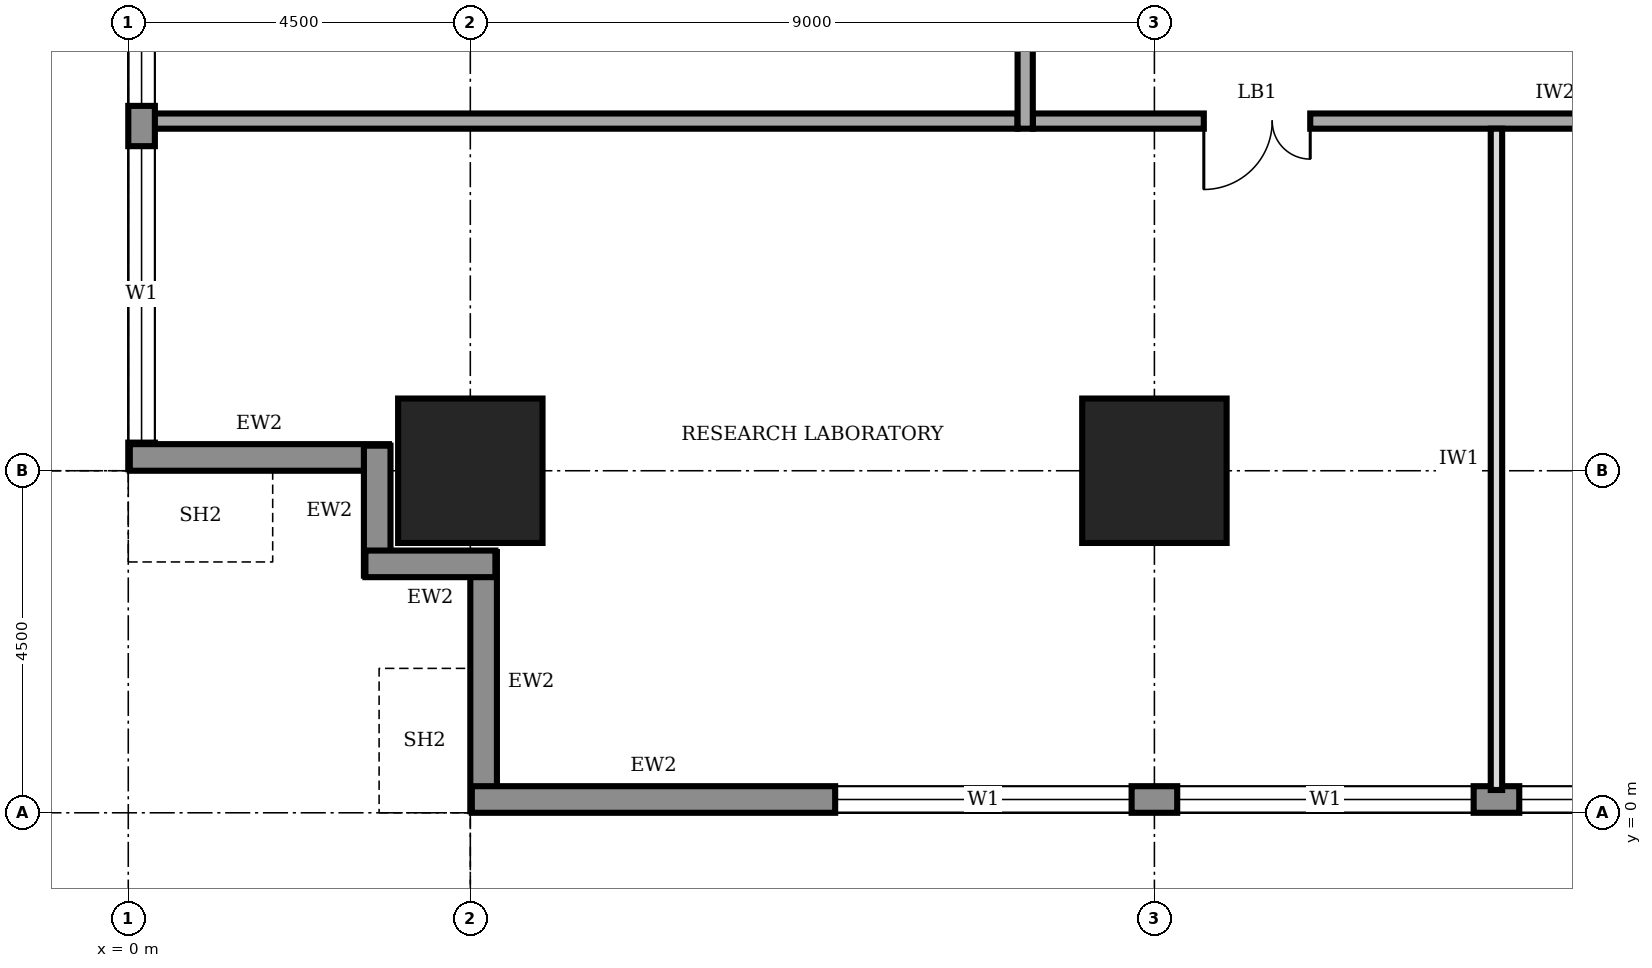
"""IFC4 building model, lengths in metres.
Left out: names, types, materials, properties, quantities, classifications, styles, units other than length and angle.
Written with IfcOpenShell. Run it as: python <this file> out.ifc"""

import sys

from ifc_helpers import new_model, si_unit, direction, frame, frame_2d, origin, origin_2d, place, context, subcontext, project, spatial, rectangle, extrude, element, fill, save


model = new_model("IFC4")
c1 = context("Model", 3, precision=1e-05, world=origin(), true_north=direction((0.0, 1.0)))
c2 = subcontext(c1, "Body", "Model", "MODEL_VIEW")
j1 = project(units=[si_unit("LENGTHUNIT", "METRE"), si_unit("PLANEANGLEUNIT", "RADIAN")], contexts=[c1])
p1 = place(None, origin())
s1 = spatial("IfcSite", under=j1, at=p1, CompositionType="ELEMENT")
p2 = place(p1, origin())
s2 = spatial("IfcBuilding", under=s1, at=p2, CompositionType="ELEMENT")
p3 = place(p2, frame((0.0, 0.0, 125.0)))
s3 = spatial("IfcBuildingStorey", under=s2, at=p3, CompositionType="ELEMENT", Elevation=125.0)
for number, where, z_axis, x_axis in (
    (1, (4.5, 4.5, 0.0), (0.0, 0.0, 1.0), (1.0, 0.0, 0.0)),
    (2, (13.5, 4.5, 0.0), (0.0, 0.0, 1.0), (1.0, 0.0, 0.0)),
):
    element("IfcColumn", number, at=place(p3, frame(where, z_axis=z_axis, x_axis=x_axis)), inside=s3, PredefinedType="COLUMN", context=c2, shape_type="SweptSolid", body=[
        extrude(rectangle(XDim=1.9, YDim=1.9, at=origin_2d()), origin(), (0.0, 0.0, 1.0), 4.0),
    ])
p4 = place(p3, frame((4.675, 3.43, 0.0), z_axis=(0.0, 0.0, 1.0), x_axis=(0.0, -1.0, 0.0)))
e3 = element("IfcWall", 3, at=p4, inside=s3, PredefinedType="STANDARD", context=c2, shape_type="SweptSolid", body=[
    extrude(rectangle(XDim=3.41, YDim=0.35, at=frame_2d((1.705, 0.0))), origin(), (0.0, 0.0, 1.0), 2.85),
])
p5 = place(p3, frame((4.52, 0.175, 0.0), z_axis=(0.0, 0.0, 1.0), x_axis=(1.0, 0.0, 0.0)))
e4 = element("IfcWall", 4, at=p5, inside=s3, PredefinedType="STANDARD", context=c2, shape_type="SweptSolid", body=[
    extrude(rectangle(XDim=31.46, YDim=0.35, at=frame_2d((15.73, 0.0))), origin(), (0.0, 0.0, 1.0), 3.75),
])
p6 = place(p5, frame((4.78, 0.0, 0.9)))
e5 = element("IfcOpeningElement", 5, at=p6, cuts=e4, PredefinedType="OPENING", context=c2, shape_type="SweptSolid", body=[
    extrude(rectangle(XDim=3.9, YDim=2.2, at=frame_2d((1.95, 1.1))), frame((0.0, 0.185, 0.0), z_axis=(0.0, -1.0, 0.0), x_axis=(1.0, 0.0, 0.0)), (0.0, 0.0, 1.0), 0.37),
])
p7 = place(p5, frame((9.28, 0.0, 0.9)))
e6 = element("IfcOpeningElement", 6, at=p7, cuts=e4, PredefinedType="OPENING", context=c2, shape_type="SweptSolid", body=[
    extrude(rectangle(XDim=3.9, YDim=2.2, at=frame_2d((1.95, 1.1))), frame((0.0, 0.185, 0.0), z_axis=(0.0, -1.0, 0.0), x_axis=(1.0, 0.0, 0.0)), (0.0, 0.0, 1.0), 0.37),
])
p8 = place(p5, frame((13.78, 0.0, 0.9)))
e7 = element("IfcOpeningElement", 7, at=p8, cuts=e4, PredefinedType="OPENING", context=c2, shape_type="SweptSolid", body=[
    extrude(rectangle(XDim=3.9, YDim=2.2, at=frame_2d((1.95, 1.1))), frame((0.0, 0.185, 0.0), z_axis=(0.0, -1.0, 0.0), x_axis=(1.0, 0.0, 0.0)), (0.0, 0.0, 1.0), 0.37),
])
p9 = place(p5, frame((18.28, 0.0, 0.9)))
e8 = element("IfcOpeningElement", 8, at=p9, cuts=e4, PredefinedType="OPENING", context=c2, shape_type="SweptSolid", body=[
    extrude(rectangle(XDim=3.9, YDim=2.2, at=frame_2d((1.95, 1.1))), frame((0.0, 0.185, 0.0), z_axis=(0.0, -1.0, 0.0), x_axis=(1.0, 0.0, 0.0)), (0.0, 0.0, 1.0), 0.37),
])
p10 = place(p5, frame((22.78, 0.0, 0.9)))
e9 = element("IfcOpeningElement", 9, at=p10, cuts=e4, PredefinedType="OPENING", context=c2, shape_type="SweptSolid", body=[
    extrude(rectangle(XDim=3.9, YDim=2.2, at=frame_2d((1.95, 1.1))), frame((0.0, 0.185, 0.0), z_axis=(0.0, -1.0, 0.0), x_axis=(1.0, 0.0, 0.0)), (0.0, 0.0, 1.0), 0.37),
])
p11 = place(p5, frame((27.21, 0.0, 0.9)))
e10 = element("IfcOpeningElement", 10, at=p11, cuts=e4, PredefinedType="OPENING", context=c2, shape_type="SweptSolid", body=[
    extrude(rectangle(XDim=3.9, YDim=2.2, at=frame_2d((1.95, 1.1))), frame((0.0, 0.185, 0.0), z_axis=(0.0, -1.0, 0.0), x_axis=(1.0, 0.0, 0.0)), (0.0, 0.0, 1.0), 0.37),
])
p12 = place(p3, frame((0.175, 35.98, 0.0), z_axis=(0.0, 0.0, 1.0), x_axis=(0.0, -1.0, 0.0)))
e11 = element("IfcWall", 11, at=p12, inside=s3, PredefinedType="STANDARD", context=c2, shape_type="SweptSolid", body=[
    extrude(rectangle(XDim=31.46, YDim=0.35, at=frame_2d((15.73, 0.0))), origin(), (0.0, 0.0, 1.0), 3.75),
])
p13 = place(p12, frame((27.21, 0.0, 0.9)))
e12 = element("IfcOpeningElement", 12, at=p13, cuts=e11, PredefinedType="OPENING", context=c2, shape_type="SweptSolid", body=[
    extrude(rectangle(XDim=3.9, YDim=2.2, at=frame_2d((1.95, 1.1))), frame((0.0, 0.185, 0.0), z_axis=(0.0, -1.0, 0.0), x_axis=(1.0, 0.0, 0.0)), (0.0, 0.0, 1.0), 0.37),
])
p14 = place(p12, frame((22.78, 0.0, 0.9)))
e13 = element("IfcOpeningElement", 13, at=p14, cuts=e11, PredefinedType="OPENING", context=c2, shape_type="SweptSolid", body=[
    extrude(rectangle(XDim=3.9, YDim=2.2, at=frame_2d((1.95, 1.1))), frame((0.0, 0.185, 0.0), z_axis=(0.0, -1.0, 0.0), x_axis=(1.0, 0.0, 0.0)), (0.0, 0.0, 1.0), 0.37),
])
p15 = place(p12, frame((18.28, 0.0, 0.9)))
e14 = element("IfcOpeningElement", 14, at=p15, cuts=e11, PredefinedType="OPENING", context=c2, shape_type="SweptSolid", body=[
    extrude(rectangle(XDim=3.9, YDim=2.2, at=frame_2d((1.95, 1.1))), frame((0.0, 0.185, 0.0), z_axis=(0.0, -1.0, 0.0), x_axis=(1.0, 0.0, 0.0)), (0.0, 0.0, 1.0), 0.37),
])
p16 = place(p12, frame((13.78, 0.0, 0.9)))
e15 = element("IfcOpeningElement", 15, at=p16, cuts=e11, PredefinedType="OPENING", context=c2, shape_type="SweptSolid", body=[
    extrude(rectangle(XDim=3.9, YDim=2.2, at=frame_2d((1.95, 1.1))), frame((0.0, 0.185, 0.0), z_axis=(0.0, -1.0, 0.0), x_axis=(1.0, 0.0, 0.0)), (0.0, 0.0, 1.0), 0.37),
])
p17 = place(p12, frame((9.28, 0.0, 0.9)))
e16 = element("IfcOpeningElement", 16, at=p17, cuts=e11, PredefinedType="OPENING", context=c2, shape_type="SweptSolid", body=[
    extrude(rectangle(XDim=3.9, YDim=2.2, at=frame_2d((1.95, 1.1))), frame((0.0, 0.185, 0.0), z_axis=(0.0, -1.0, 0.0), x_axis=(1.0, 0.0, 0.0)), (0.0, 0.0, 1.0), 0.37),
])
p18 = place(p12, frame((4.78, 0.0, 0.9)))
e17 = element("IfcOpeningElement", 17, at=p18, cuts=e11, PredefinedType="OPENING", context=c2, shape_type="SweptSolid", body=[
    extrude(rectangle(XDim=3.9, YDim=2.2, at=frame_2d((1.95, 1.1))), frame((0.0, 0.185, 0.0), z_axis=(0.0, -1.0, 0.0), x_axis=(1.0, 0.0, 0.0)), (0.0, 0.0, 1.0), 0.37),
])
p19 = place(p3, frame((0.02, 4.675, 0.0), z_axis=(0.0, 0.0, 1.0), x_axis=(1.0, 0.0, 0.0)))
e18 = element("IfcWall", 18, at=p19, inside=s3, PredefinedType="STANDARD", context=c2, shape_type="SweptSolid", body=[
    extrude(rectangle(XDim=3.41, YDim=0.35, at=frame_2d((1.705, 0.0))), origin(), (0.0, 0.0, 1.0), 2.85),
])
for number, where, z_axis, x_axis in (
    (19, (3.275, 4.83, 0.0), (0.0, 0.0, 1.0), (0.0, -1.0, 0.0)),
    (20, (3.12, 3.275, 0.0), (0.0, 0.0, 1.0), (1.0, 0.0, 0.0)),
):
    element("IfcWall", number, at=place(p3, frame(where, z_axis=z_axis, x_axis=x_axis)), inside=s3, PredefinedType="STANDARD", context=c2, shape_type="SweptSolid", body=[
        extrude(rectangle(XDim=1.71, YDim=0.35, at=frame_2d((0.855, 0.0))), origin(), (0.0, 0.0, 1.0), 3.75),
    ])
p20 = place(p3, frame((11.9, 9.1, 0.0), z_axis=(0.0, 0.0, 1.0), x_axis=(1.0, 0.0, 0.0)))
e21 = element("IfcWall", 21, at=p20, inside=s3, PredefinedType="SOLIDWALL", context=c2, shape_type="SweptSolid", body=[
    extrude(rectangle(XDim=17.65, YDim=0.2, at=frame_2d((8.825, 0.0))), origin(), (0.0, 0.0, 1.0), 3.75),
])
p21 = place(p20, frame((2.25, 0.0, 0.0)))
e22 = element("IfcOpeningElement", 22, at=p21, cuts=e21, PredefinedType="OPENING", context=c2, shape_type="SweptSolid", body=[
    extrude(rectangle(XDim=1.4, YDim=2.1, at=frame_2d((0.7, 1.05))), frame((0.0, 0.11, 0.0), z_axis=(0.0, -1.0, 0.0), x_axis=(1.0, 0.0, 0.0)), (0.0, 0.0, 1.0), 0.22),
])
p22 = place(p20, frame((10.1, 0.0, 0.0)))
e23 = element("IfcOpeningElement", 23, at=p22, cuts=e21, PredefinedType="OPENING", context=c2, shape_type="SweptSolid", body=[
    extrude(rectangle(XDim=1.0, YDim=2.1, at=frame_2d((0.5, 1.05))), frame((0.0, 0.11, 0.0), z_axis=(0.0, -1.0, 0.0), x_axis=(1.0, 0.0, 0.0)), (0.0, 0.0, 1.0), 0.22),
])
p23 = place(p20, frame((15.875, 0.0, 0.0)))
e24 = element("IfcOpeningElement", 24, at=p23, cuts=e21, PredefinedType="OPENING", context=c2, shape_type="SweptSolid", body=[
    extrude(rectangle(XDim=1.0, YDim=2.1, at=frame_2d((0.5, 1.05))), frame((0.0, 0.11, 0.0), z_axis=(0.0, -1.0, 0.0), x_axis=(1.0, 0.0, 0.0)), (0.0, 0.0, 1.0), 0.22),
])
p24 = place(p3, frame((11.8, 32.05, 0.0), z_axis=(0.0, 0.0, 1.0), x_axis=(0.0, -1.0, 0.0)))
e25 = element("IfcWall", 25, at=p24, inside=s3, PredefinedType="SOLIDWALL", context=c2, shape_type="SweptSolid", body=[
    extrude(rectangle(XDim=23.05, YDim=0.2, at=frame_2d((11.525, 0.0))), origin(), (0.0, 0.0, 1.0), 3.75),
])
p25 = place(p24, frame((20.3, 0.0, 0.0)))
e26 = element("IfcOpeningElement", 26, at=p25, cuts=e25, PredefinedType="OPENING", context=c2, shape_type="SweptSolid", body=[
    extrude(rectangle(XDim=1.0, YDim=2.1, at=frame_2d((0.5, 1.05))), frame((0.0, 0.11, 0.0), z_axis=(0.0, -1.0, 0.0), x_axis=(1.0, 0.0, 0.0)), (0.0, 0.0, 1.0), 0.22),
])
p26 = place(p24, frame((16.95, 0.0, 0.0)))
e27 = element("IfcOpeningElement", 27, at=p26, cuts=e25, PredefinedType="OPENING", context=c2, shape_type="SweptSolid", body=[
    extrude(rectangle(XDim=1.0, YDim=2.1, at=frame_2d((0.5, 1.05))), frame((0.0, 0.11, 0.0), z_axis=(0.0, -1.0, 0.0), x_axis=(1.0, 0.0, 0.0)), (0.0, 0.0, 1.0), 0.22),
])
p27 = place(p24, frame((13.95, 0.0, 0.0)))
e28 = element("IfcOpeningElement", 28, at=p27, cuts=e25, PredefinedType="OPENING", context=c2, shape_type="SweptSolid", body=[
    extrude(rectangle(XDim=0.9, YDim=2.1, at=frame_2d((0.45, 1.05))), frame((0.0, 0.11, 0.0), z_axis=(0.0, -1.0, 0.0), x_axis=(1.0, 0.0, 0.0)), (0.0, 0.0, 1.0), 0.22),
])
p28 = place(p24, frame((10.9, 0.0, 0.0)))
e29 = element("IfcOpeningElement", 29, at=p28, cuts=e25, PredefinedType="OPENING", context=c2, shape_type="SweptSolid", body=[
    extrude(rectangle(XDim=0.9, YDim=2.1, at=frame_2d((0.45, 1.05))), frame((0.0, 0.11, 0.0), z_axis=(0.0, -1.0, 0.0), x_axis=(1.0, 0.0, 0.0)), (0.0, 0.0, 1.0), 0.22),
])
p29 = place(p24, frame((6.2, 0.0, 0.0)))
e30 = element("IfcOpeningElement", 30, at=p29, cuts=e25, PredefinedType="OPENING", context=c2, shape_type="SweptSolid", body=[
    extrude(rectangle(XDim=0.9, YDim=2.1, at=frame_2d((0.45, 1.05))), frame((0.0, 0.11, 0.0), z_axis=(0.0, -1.0, 0.0), x_axis=(1.0, 0.0, 0.0)), (0.0, 0.0, 1.0), 0.22),
])
p30 = place(p24, frame((8.75, 0.0, 0.0)))
e31 = element("IfcOpeningElement", 31, at=p30, cuts=e25, PredefinedType="OPENING", context=c2, shape_type="SweptSolid", body=[
    extrude(rectangle(XDim=1.0, YDim=2.1, at=frame_2d((0.5, 1.05))), frame((0.0, 0.11, 0.0), z_axis=(0.0, -1.0, 0.0), x_axis=(1.0, 0.0, 0.0)), (0.0, 0.0, 1.0), 0.22),
])
p31 = place(p24, frame((1.925, 0.0, 0.0)))
e32 = element("IfcOpeningElement", 32, at=p31, cuts=e25, PredefinedType="OPENING", context=c2, shape_type="SweptSolid", body=[
    extrude(rectangle(XDim=1.0, YDim=2.1, at=frame_2d((0.5, 1.05))), frame((0.0, 0.11, 0.0), z_axis=(0.0, -1.0, 0.0), x_axis=(1.0, 0.0, 0.0)), (0.0, 0.0, 1.0), 0.22),
])
p32 = place(p3, frame((0.3, 9.1, 0.0), z_axis=(0.0, 0.0, 1.0), x_axis=(1.0, 0.0, 0.0)))
e33 = element("IfcWall", 33, at=p32, inside=s3, PredefinedType="SOLIDWALL", context=c2, shape_type="SweptSolid", body=[
    extrude(rectangle(XDim=11.4, YDim=0.2, at=frame_2d((5.7, 0.0))), origin(), (0.0, 0.0, 1.0), 3.75),
])
p33 = place(p3, frame((18.0, 0.3, 0.0), z_axis=(0.0, 0.0, 1.0), x_axis=(0.0, 1.0, 0.0)))
e34 = element("IfcWall", 34, at=p33, inside=s3, PredefinedType="PARTITIONING", context=c2, shape_type="SweptSolid", body=[
    extrude(rectangle(XDim=8.7, YDim=0.15, at=frame_2d((4.35, 0.0))), origin(), (0.0, 0.0, 1.0), 3.75),
])
p34 = place(p6, origin())
e35 = element("IfcWindow", 35, at=p34, inside=s3, PartitioningType="SINGLE_PANEL", PredefinedType="WINDOW", context=c2, shape_type="SweptSolid", body=[
    extrude(rectangle(XDim=3.9, YDim=2.2, at=frame_2d((1.95, 1.1))), frame((0.0, 0.03, 0.0), z_axis=(0.0, -1.0, 0.0), x_axis=(1.0, 0.0, 0.0)), (0.0, 0.0, 1.0), 0.06),
])
fill(e5, e35)
p35 = place(p7, origin())
e36 = element("IfcWindow", 36, at=p35, inside=s3, PartitioningType="SINGLE_PANEL", PredefinedType="WINDOW", context=c2, shape_type="SweptSolid", body=[
    extrude(rectangle(XDim=3.9, YDim=2.2, at=frame_2d((1.95, 1.1))), frame((0.0, 0.03, 0.0), z_axis=(0.0, -1.0, 0.0), x_axis=(1.0, 0.0, 0.0)), (0.0, 0.0, 1.0), 0.06),
])
fill(e6, e36)
p36 = place(p8, origin())
e37 = element("IfcWindow", 37, at=p36, inside=s3, PartitioningType="SINGLE_PANEL", PredefinedType="WINDOW", context=c2, shape_type="SweptSolid", body=[
    extrude(rectangle(XDim=3.9, YDim=2.2, at=frame_2d((1.95, 1.1))), frame((0.0, 0.03, 0.0), z_axis=(0.0, -1.0, 0.0), x_axis=(1.0, 0.0, 0.0)), (0.0, 0.0, 1.0), 0.06),
])
fill(e7, e37)
p37 = place(p13, origin())
e38 = element("IfcWindow", 38, at=p37, inside=s3, PartitioningType="SINGLE_PANEL", PredefinedType="WINDOW", context=c2, shape_type="SweptSolid", body=[
    extrude(rectangle(XDim=3.9, YDim=2.2, at=frame_2d((1.95, 1.1))), frame((0.0, 0.03, 0.0), z_axis=(0.0, -1.0, 0.0), x_axis=(1.0, 0.0, 0.0)), (0.0, 0.0, 1.0), 0.06),
])
fill(e12, e38)
p38 = place(p14, origin())
e39 = element("IfcWindow", 39, at=p38, inside=s3, PartitioningType="SINGLE_PANEL", PredefinedType="WINDOW", context=c2, shape_type="SweptSolid", body=[
    extrude(rectangle(XDim=3.9, YDim=2.2, at=frame_2d((1.95, 1.1))), frame((0.0, 0.03, 0.0), z_axis=(0.0, -1.0, 0.0), x_axis=(1.0, 0.0, 0.0)), (0.0, 0.0, 1.0), 0.06),
])
fill(e13, e39)
p39 = place(p21, frame((1.4, 0.0, 0.0), z_axis=(0.0, 0.0, 1.0), x_axis=(-1.0, 0.0, 0.0)))
e40 = element("IfcDoor", 40, at=p39, inside=s3, OperationType="DOUBLE_DOOR_SINGLE_SWING", PredefinedType="DOOR", context=c2, shape_type="SweptSolid", body=[
    extrude(rectangle(XDim=1.4, YDim=2.1, at=frame_2d((0.7, 1.05))), frame((0.0, 0.025, 0.0), z_axis=(0.0, -1.0, 0.0), x_axis=(1.0, 0.0, 0.0)), (0.0, 0.0, 1.0), 0.05),
])
fill(e22, e40)
save(model, sys.argv[1])
